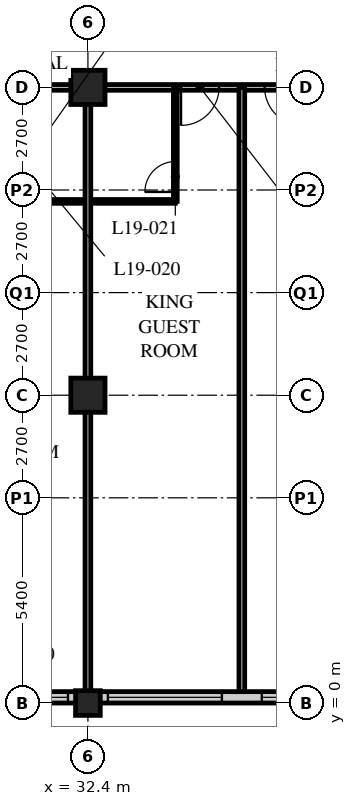
"""IFC4 building model, lengths in metres.
Left out: names, types, materials, properties, quantities, classifications, styles, units other than length and angle.
Written with IfcOpenShell. Run it as: python <this file> out.ifc"""

import sys

from ifc_helpers import new_model, si_unit, direction, frame, frame_2d, origin, origin_2d, place, context, subcontext, project, spatial, rectangle, hollow_rectangle, extrude, element, fill, save


model = new_model("IFC4")
c1 = context("Model", 3, precision=1e-05, world=origin(), true_north=direction((0.0, 1.0)))
c2 = subcontext(c1, "Body", "Model", "MODEL_VIEW")
j1 = project(units=[si_unit("LENGTHUNIT", "METRE"), si_unit("PLANEANGLEUNIT", "RADIAN")], contexts=[c1])
p1 = place(None, origin())
s1 = spatial("IfcSite", under=j1, at=p1, CompositionType="ELEMENT")
p2 = place(p1, origin())
s2 = spatial("IfcBuilding", under=s1, at=p2, CompositionType="ELEMENT")
p3 = place(p2, frame((0.0, 0.0, 77.2)))
s3 = spatial("IfcBuildingStorey", under=s2, at=p3, CompositionType="ELEMENT", Elevation=77.2)
p4 = place(p3, frame((32.4, 0.0, 0.0), z_axis=(0.0, 0.0, 1.0), x_axis=(1.0, 0.0, 0.0)))
e1 = element("IfcColumn", 1, at=p4, inside=s3, PredefinedType="COLUMN", context=c2, shape_type="SweptSolid", body=[
    extrude(hollow_rectangle(XDim=0.65, YDim=0.65, WallThickness=0.05, at=origin_2d()), origin(), (0.0, 0.0, 1.0), 3.4),
])
for number, where, z_axis, x_axis in (
    (2, (32.4, 8.1, 0.0), (0.0, 0.0, 1.0), (1.0, 0.0, 0.0)),
    (3, (32.4, 16.2, 0.0), (0.0, 0.0, 1.0), (1.0, 0.0, 0.0)),
):
    element("IfcColumn", number, at=place(p3, frame(where, z_axis=z_axis, x_axis=x_axis)), inside=s3, PredefinedType="COLUMN", context=c2, shape_type="SweptSolid", body=[
        extrude(hollow_rectangle(XDim=0.9, YDim=0.9, WallThickness=0.09, at=origin_2d()), origin(), (0.0, 0.0, 1.0), 3.4),
    ])
p5 = place(p3, frame((8.4, 0.15, 0.0), z_axis=(0.0, 0.0, 1.0), x_axis=(1.0, 0.0, 0.0)))
e4 = element("IfcWall", 4, at=p5, inside=s3, PredefinedType="SOLIDWALL", context=c2, shape_type="SweptSolid", body=[
    extrude(rectangle(XDim=40.2, YDim=0.3, at=frame_2d((20.1, 0.0))), origin(), (0.0, 0.0, 1.0), 3.19),
])
p6 = place(p5, frame((0.225, 0.0, 0.9)))
e5 = element("IfcOpeningElement", 5, at=p6, cuts=e4, PredefinedType="OPENING", context=c2, shape_type="SweptSolid", body=[
    extrude(rectangle(XDim=3.0, YDim=1.5, at=frame_2d((1.5, 0.75))), frame((0.0, 0.16, 0.0), z_axis=(0.0, -1.0, 0.0), x_axis=(1.0, 0.0, 0.0)), (0.0, 0.0, 1.0), 0.32),
])
p7 = place(p5, frame((4.275, 0.0, 0.9)))
e6 = element("IfcOpeningElement", 6, at=p7, cuts=e4, PredefinedType="OPENING", context=c2, shape_type="SweptSolid", body=[
    extrude(rectangle(XDim=3.0, YDim=1.5, at=frame_2d((1.5, 0.75))), frame((0.0, 0.16, 0.0), z_axis=(0.0, -1.0, 0.0), x_axis=(1.0, 0.0, 0.0)), (0.0, 0.0, 1.0), 0.32),
])
p8 = place(p5, frame((8.325, 0.0, 0.9)))
e7 = element("IfcOpeningElement", 7, at=p8, cuts=e4, PredefinedType="OPENING", context=c2, shape_type="SweptSolid", body=[
    extrude(rectangle(XDim=3.0, YDim=1.5, at=frame_2d((1.5, 0.75))), frame((0.0, 0.16, 0.0), z_axis=(0.0, -1.0, 0.0), x_axis=(1.0, 0.0, 0.0)), (0.0, 0.0, 1.0), 0.32),
])
p9 = place(p5, frame((12.375, 0.0, 0.9)))
e8 = element("IfcOpeningElement", 8, at=p9, cuts=e4, PredefinedType="OPENING", context=c2, shape_type="SweptSolid", body=[
    extrude(rectangle(XDim=3.0, YDim=1.5, at=frame_2d((1.5, 0.75))), frame((0.0, 0.16, 0.0), z_axis=(0.0, -1.0, 0.0), x_axis=(1.0, 0.0, 0.0)), (0.0, 0.0, 1.0), 0.32),
])
p10 = place(p5, frame((16.425, 0.0, 0.9)))
e9 = element("IfcOpeningElement", 9, at=p10, cuts=e4, PredefinedType="OPENING", context=c2, shape_type="SweptSolid", body=[
    extrude(rectangle(XDim=3.0, YDim=1.5, at=frame_2d((1.5, 0.75))), frame((0.0, 0.16, 0.0), z_axis=(0.0, -1.0, 0.0), x_axis=(1.0, 0.0, 0.0)), (0.0, 0.0, 1.0), 0.32),
])
p11 = place(p5, frame((20.475, 0.0, 0.9)))
e10 = element("IfcOpeningElement", 10, at=p11, cuts=e4, PredefinedType="OPENING", context=c2, shape_type="SweptSolid", body=[
    extrude(rectangle(XDim=3.0, YDim=1.5, at=frame_2d((1.5, 0.75))), frame((0.0, 0.16, 0.0), z_axis=(0.0, -1.0, 0.0), x_axis=(1.0, 0.0, 0.0)), (0.0, 0.0, 1.0), 0.32),
])
p12 = place(p5, frame((24.525, 0.0, 0.9)))
e11 = element("IfcOpeningElement", 11, at=p12, cuts=e4, PredefinedType="OPENING", context=c2, shape_type="SweptSolid", body=[
    extrude(rectangle(XDim=3.0, YDim=1.5, at=frame_2d((1.5, 0.75))), frame((0.0, 0.16, 0.0), z_axis=(0.0, -1.0, 0.0), x_axis=(1.0, 0.0, 0.0)), (0.0, 0.0, 1.0), 0.32),
])
p13 = place(p5, frame((28.575, 0.0, 0.9)))
e12 = element("IfcOpeningElement", 12, at=p13, cuts=e4, PredefinedType="OPENING", context=c2, shape_type="SweptSolid", body=[
    extrude(rectangle(XDim=3.0, YDim=1.5, at=frame_2d((1.5, 0.75))), frame((0.0, 0.16, 0.0), z_axis=(0.0, -1.0, 0.0), x_axis=(1.0, 0.0, 0.0)), (0.0, 0.0, 1.0), 0.32),
])
p14 = place(p5, frame((32.625, 0.0, 0.9)))
e13 = element("IfcOpeningElement", 13, at=p14, cuts=e4, PredefinedType="OPENING", context=c2, shape_type="SweptSolid", body=[
    extrude(rectangle(XDim=3.0, YDim=1.5, at=frame_2d((1.5, 0.75))), frame((0.0, 0.16, 0.0), z_axis=(0.0, -1.0, 0.0), x_axis=(1.0, 0.0, 0.0)), (0.0, 0.0, 1.0), 0.32),
])
p15 = place(p5, frame((36.675, 0.0, 0.9)))
e14 = element("IfcOpeningElement", 14, at=p15, cuts=e4, PredefinedType="OPENING", context=c2, shape_type="SweptSolid", body=[
    extrude(rectangle(XDim=3.0, YDim=1.5, at=frame_2d((1.5, 0.75))), frame((0.0, 0.16, 0.0), z_axis=(0.0, -1.0, 0.0), x_axis=(1.0, 0.0, 0.0)), (0.0, 0.0, 1.0), 0.32),
])
p16 = place(p3, frame((12.15, 16.2, 0.0), z_axis=(0.0, 0.0, 1.0), x_axis=(1.0, 0.0, 0.0)))
e15 = element("IfcWall", 15, at=p16, inside=s3, PredefinedType="PARTITIONING", context=c2, shape_type="SweptSolid", body=[
    extrude(rectangle(XDim=36.45, YDim=0.15, at=frame_2d((18.225, 0.0))), origin(), (0.0, 0.0, 1.0), 2.428),
])
p17 = place(p16, frame((6.5, 0.0, 0.0)))
e16 = element("IfcOpeningElement", 16, at=p17, cuts=e15, PredefinedType="OPENING", context=c2, shape_type="SweptSolid", body=[
    extrude(rectangle(XDim=1.0, YDim=2.1, at=frame_2d((0.5, 1.05))), frame((0.0, 0.085, 0.0), z_axis=(0.0, -1.0, 0.0), x_axis=(1.0, 0.0, 0.0)), (0.0, 0.0, 1.0), 0.17),
])
p18 = place(p16, frame((8.4, 0.0, 0.0)))
e17 = element("IfcOpeningElement", 17, at=p18, cuts=e15, PredefinedType="OPENING", context=c2, shape_type="SweptSolid", body=[
    extrude(rectangle(XDim=1.0, YDim=2.1, at=frame_2d((0.5, 1.05))), frame((0.0, 0.085, 0.0), z_axis=(0.0, -1.0, 0.0), x_axis=(1.0, 0.0, 0.0)), (0.0, 0.0, 1.0), 0.17),
])
p19 = place(p16, frame((14.9, 0.0, 0.0)))
e18 = element("IfcOpeningElement", 18, at=p19, cuts=e15, PredefinedType="OPENING", context=c2, shape_type="SweptSolid", body=[
    extrude(rectangle(XDim=1.0, YDim=2.1, at=frame_2d((0.5, 1.05))), frame((0.0, 0.085, 0.0), z_axis=(0.0, -1.0, 0.0), x_axis=(1.0, 0.0, 0.0)), (0.0, 0.0, 1.0), 0.17),
])
p20 = place(p16, frame((16.5, 0.0, 0.0)))
e19 = element("IfcOpeningElement", 19, at=p20, cuts=e15, PredefinedType="OPENING", context=c2, shape_type="SweptSolid", body=[
    extrude(rectangle(XDim=1.0, YDim=2.1, at=frame_2d((0.5, 1.05))), frame((0.0, 0.085, 0.0), z_axis=(0.0, -1.0, 0.0), x_axis=(1.0, 0.0, 0.0)), (0.0, 0.0, 1.0), 0.17),
])
p21 = place(p16, frame((22.7, 0.0, 0.0)))
e20 = element("IfcOpeningElement", 20, at=p21, cuts=e15, PredefinedType="OPENING", context=c2, shape_type="SweptSolid", body=[
    extrude(rectangle(XDim=1.0, YDim=2.1, at=frame_2d((0.5, 1.05))), frame((0.0, 0.085, 0.0), z_axis=(0.0, -1.0, 0.0), x_axis=(1.0, 0.0, 0.0)), (0.0, 0.0, 1.0), 0.17),
])
p22 = place(p16, frame((24.9, 0.0, 0.0)))
e21 = element("IfcOpeningElement", 21, at=p22, cuts=e15, PredefinedType="OPENING", context=c2, shape_type="SweptSolid", body=[
    extrude(rectangle(XDim=1.0, YDim=2.1, at=frame_2d((0.5, 1.05))), frame((0.0, 0.085, 0.0), z_axis=(0.0, -1.0, 0.0), x_axis=(1.0, 0.0, 0.0)), (0.0, 0.0, 1.0), 0.17),
])
p23 = place(p16, frame((30.8, 0.0, 0.0)))
e22 = element("IfcOpeningElement", 22, at=p23, cuts=e15, PredefinedType="OPENING", context=c2, shape_type="SweptSolid", body=[
    extrude(rectangle(XDim=1.0, YDim=2.1, at=frame_2d((0.5, 1.05))), frame((0.0, 0.085, 0.0), z_axis=(0.0, -1.0, 0.0), x_axis=(1.0, 0.0, 0.0)), (0.0, 0.0, 1.0), 0.17),
])
p24 = place(p16, frame((1.525, 0.0, 0.0)))
e23 = element("IfcOpeningElement", 23, at=p24, cuts=e15, PredefinedType="OPENING", context=c2, shape_type="SweptSolid", body=[
    extrude(rectangle(XDim=1.0, YDim=2.1, at=frame_2d((0.5, 1.05))), frame((0.0, 0.085, 0.0), z_axis=(0.0, -1.0, 0.0), x_axis=(1.0, 0.0, 0.0)), (0.0, 0.0, 1.0), 0.17),
])
p25 = place(p16, frame((33.925, 0.0, 0.0)))
e24 = element("IfcOpeningElement", 24, at=p25, cuts=e15, PredefinedType="OPENING", context=c2, shape_type="SweptSolid", body=[
    extrude(rectangle(XDim=1.0, YDim=2.1, at=frame_2d((0.5, 1.05))), frame((0.0, 0.085, 0.0), z_axis=(0.0, -1.0, 0.0), x_axis=(1.0, 0.0, 0.0)), (0.0, 0.0, 1.0), 0.17),
])
p26 = place(p3, frame((29.8, 13.2, 0.0), z_axis=(0.0, 0.0, 1.0), x_axis=(1.0, 0.0, 0.0)))
e25 = element("IfcWall", 25, at=p26, inside=s3, PredefinedType="PARTITIONING", context=c2, shape_type="SweptSolid", body=[
    extrude(rectangle(XDim=4.9, YDim=0.1, at=frame_2d((2.45, 0.0))), origin(), (0.0, 0.0, 1.0), 3.19),
])
p27 = place(p3, frame((32.4, 16.2, 0.0), z_axis=(0.0, 0.0, 1.0), x_axis=(0.0, -1.0, 0.0)))
e26 = element("IfcWall", 26, at=p27, inside=s3, PredefinedType="PARTITIONING", context=c2, shape_type="SweptSolid", body=[
    extrude(rectangle(XDim=15.9, YDim=0.15, at=frame_2d((7.95, 0.0))), origin(), (0.0, 0.0, 1.0), 2.428),
])
p28 = place(p3, frame((34.7, 16.2, 0.0), z_axis=(0.0, 0.0, 1.0), x_axis=(0.0, -1.0, 0.0)))
e27 = element("IfcWall", 27, at=p28, inside=s3, PredefinedType="PARTITIONING", context=c2, shape_type="SweptSolid", body=[
    extrude(rectangle(XDim=3.0, YDim=0.1, at=frame_2d((1.5, 0.0))), origin(), (0.0, 0.0, 1.0), 3.19),
])
p29 = place(p28, frame((1.95, 0.0, 0.0)))
e28 = element("IfcOpeningElement", 28, at=p29, cuts=e27, PredefinedType="OPENING", context=c2, shape_type="SweptSolid", body=[
    extrude(rectangle(XDim=0.8, YDim=2.1, at=frame_2d((0.4, 1.05))), frame((0.0, 0.06, 0.0), z_axis=(0.0, -1.0, 0.0), x_axis=(1.0, 0.0, 0.0)), (0.0, 0.0, 1.0), 0.12),
])
p30 = place(p3, frame((36.45, 16.2, 0.0), z_axis=(0.0, 0.0, 1.0), x_axis=(0.0, -1.0, 0.0)))
e29 = element("IfcWall", 29, at=p30, inside=s3, PredefinedType="PARTITIONING", context=c2, shape_type="SweptSolid", body=[
    extrude(rectangle(XDim=15.9, YDim=0.15, at=frame_2d((7.95, 0.0))), origin(), (0.0, 0.0, 1.0), 3.19),
])
p31 = place(p11, origin())
e30 = element("IfcWindow", 30, at=p31, inside=s3, PartitioningType="SINGLE_PANEL", PredefinedType="WINDOW", context=c2, shape_type="SweptSolid", body=[
    extrude(rectangle(XDim=3.0, YDim=1.5, at=frame_2d((1.5, 0.75))), frame((0.0, 0.03, 0.0), z_axis=(0.0, -1.0, 0.0), x_axis=(1.0, 0.0, 0.0)), (0.0, 0.0, 1.0), 0.06),
])
fill(e10, e30)
p32 = place(p12, origin())
e31 = element("IfcWindow", 31, at=p32, inside=s3, PartitioningType="SINGLE_PANEL", PredefinedType="WINDOW", context=c2, shape_type="SweptSolid", body=[
    extrude(rectangle(XDim=3.0, YDim=1.5, at=frame_2d((1.5, 0.75))), frame((0.0, 0.03, 0.0), z_axis=(0.0, -1.0, 0.0), x_axis=(1.0, 0.0, 0.0)), (0.0, 0.0, 1.0), 0.06),
])
fill(e11, e31)
p33 = place(p13, origin())
e32 = element("IfcWindow", 32, at=p33, inside=s3, PartitioningType="SINGLE_PANEL", PredefinedType="WINDOW", context=c2, shape_type="SweptSolid", body=[
    extrude(rectangle(XDim=3.0, YDim=1.5, at=frame_2d((1.5, 0.75))), frame((0.0, 0.03, 0.0), z_axis=(0.0, -1.0, 0.0), x_axis=(1.0, 0.0, 0.0)), (0.0, 0.0, 1.0), 0.06),
])
fill(e12, e32)
p34 = place(p29, origin())
e33 = element("IfcDoor", 33, at=p34, inside=s3, OperationType="SINGLE_SWING_LEFT", PredefinedType="DOOR", context=c2, shape_type="SweptSolid", body=[
    extrude(rectangle(XDim=0.8, YDim=2.1, at=frame_2d((0.4, 1.05))), frame((0.0, 0.025, 0.0), z_axis=(0.0, -1.0, 0.0), x_axis=(1.0, 0.0, 0.0)), (0.0, 0.0, 1.0), 0.05),
])
fill(e28, e33)
p35 = place(p21, origin())
e34 = element("IfcDoor", 34, at=p35, inside=s3, OperationType="SINGLE_SWING_RIGHT", PredefinedType="DOOR", context=c2, shape_type="SweptSolid", body=[
    extrude(rectangle(XDim=1.0, YDim=2.1, at=frame_2d((0.5, 1.05))), frame((0.0, 0.025, 0.0), z_axis=(0.0, -1.0, 0.0), x_axis=(1.0, 0.0, 0.0)), (0.0, 0.0, 1.0), 0.05),
])
fill(e20, e34)
p36 = place(p22, origin())
e35 = element("IfcDoor", 35, at=p36, inside=s3, OperationType="SINGLE_SWING_LEFT", PredefinedType="DOOR", context=c2, shape_type="SweptSolid", body=[
    extrude(rectangle(XDim=1.0, YDim=2.1, at=frame_2d((0.5, 1.05))), frame((0.0, 0.025, 0.0), z_axis=(0.0, -1.0, 0.0), x_axis=(1.0, 0.0, 0.0)), (0.0, 0.0, 1.0), 0.05),
])
fill(e21, e35)
save(model, sys.argv[1])
